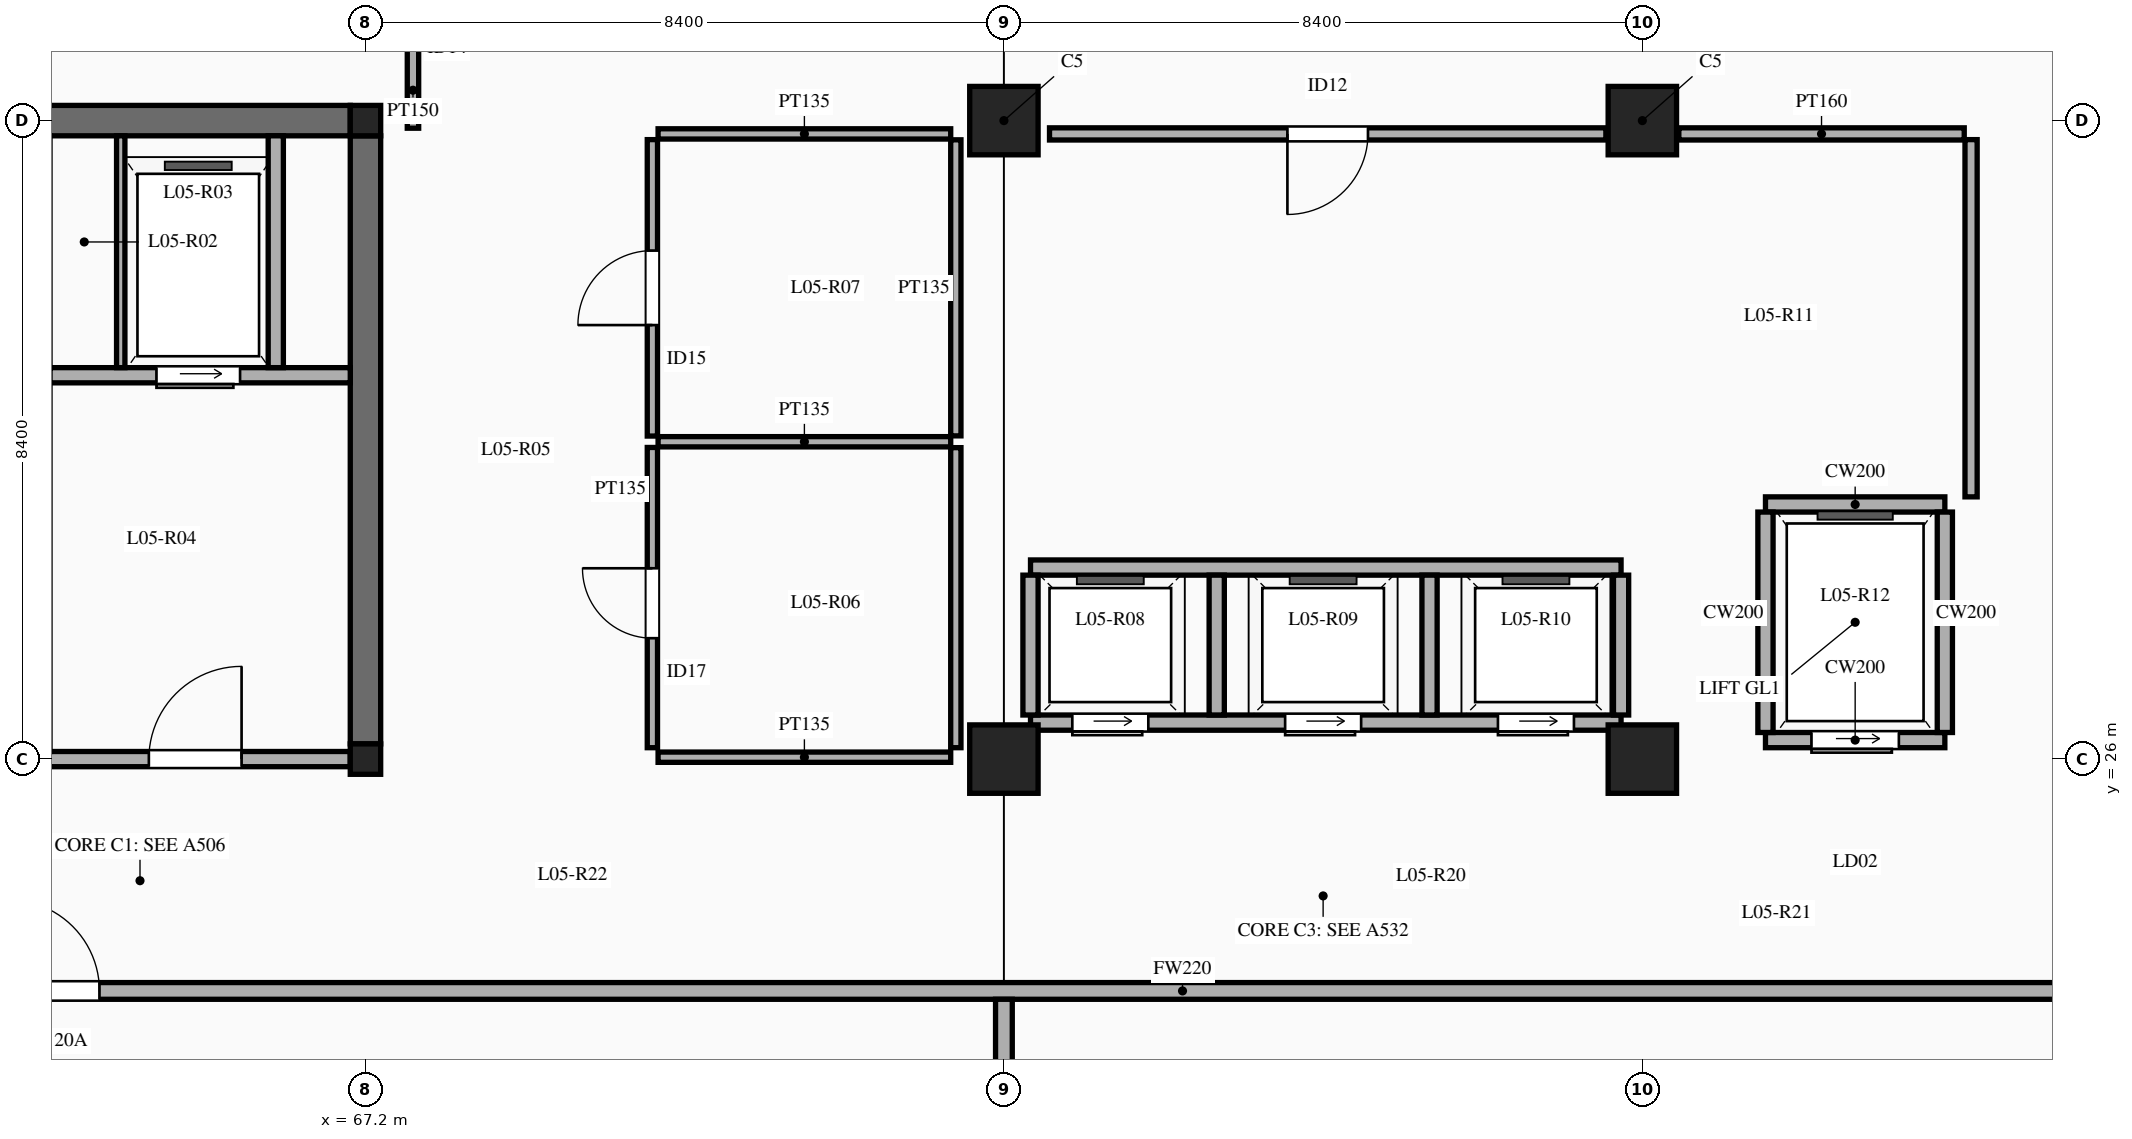
"""IFC4 building model, lengths in metres.
Left out: names, types, materials, properties, quantities, classifications, styles, units other than length and angle.
Written with IfcOpenShell. Run it as: python <this file> out.ifc"""

import sys

from ifc_helpers import new_model, si_unit, direction, frame, frame_2d, origin, origin_2d, place, context, subcontext, project, spatial, rectangle, extrude, element, fill, save


model = new_model("IFC4")
c1 = context("Model", 3, precision=1e-05, world=origin(), true_north=direction((0.0, 1.0)))
c2 = subcontext(c1, "Body", "Model", "MODEL_VIEW")
j1 = project(units=[si_unit("LENGTHUNIT", "METRE"), si_unit("PLANEANGLEUNIT", "RADIAN")], contexts=[c1])
p1 = place(None, origin())
s1 = spatial("IfcSite", under=j1, at=p1, CompositionType="ELEMENT")
p2 = place(p1, origin())
s2 = spatial("IfcBuilding", under=s1, at=p2, CompositionType="ELEMENT")
p3 = place(p2, frame((0.0, 0.0, 24.0)))
s3 = spatial("IfcBuildingStorey", under=s2, at=p3, CompositionType="ELEMENT", Elevation=24.0)
for number, where, z_axis, x_axis in (
    (1, (67.2, 26.0, 0.0), (0.0, 0.0, 1.0), (1.0, 0.0, 0.0)),
    (2, (67.2, 34.4, 0.0), (0.0, 0.0, 1.0), (1.0, 0.0, 0.0)),
):
    element("IfcColumn", number, at=place(p3, frame(where, z_axis=z_axis, x_axis=x_axis)), inside=s3, PredefinedType="COLUMN", context=c2, shape_type="SweptSolid", body=[
        extrude(rectangle(XDim=0.4, YDim=0.4, at=origin_2d()), origin(), (0.0, 0.0, 1.0), 4.5),
    ])
for number, where, z_axis, x_axis in (
    (3, (75.6, 26.0, 0.0), (0.0, 0.0, 1.0), (1.0, 0.0, 0.0)),
    (4, (75.6, 34.4, 0.0), (0.0, 0.0, 1.0), (1.0, 0.0, 0.0)),
    (5, (84.0, 26.0, 0.0), (0.0, 0.0, 1.0), (1.0, 0.0, 0.0)),
    (6, (84.0, 34.4, 0.0), (0.0, 0.0, 1.0), (1.0, 0.0, 0.0)),
):
    element("IfcColumn", number, at=place(p3, frame(where, z_axis=z_axis, x_axis=x_axis)), inside=s3, PredefinedType="COLUMN", context=c2, shape_type="SweptSolid", body=[
        extrude(rectangle(XDim=0.9, YDim=0.9, at=origin_2d()), origin(), (0.0, 0.0, 1.0), 4.5),
    ])
for number, where, z_axis, x_axis in (
    (7, (67.2, 26.2, 0.0), (0.0, 0.0, 1.0), (0.0, 1.0, 0.0)),
    (8, (59.0, 34.4, 0.0), (0.0, 0.0, 1.0), (1.0, 0.0, 0.0)),
):
    element("IfcWall", number, at=place(p3, frame(where, z_axis=z_axis, x_axis=x_axis)), inside=s3, PredefinedType="SHEAR", context=c2, shape_type="SweptSolid", body=[
        extrude(rectangle(XDim=8.0, YDim=0.4, at=frame_2d((4.0, 0.0))), origin(), (0.0, 0.0, 1.0), 4.5),
    ])
p4 = place(p3, frame((59.0, 26.0, 0.0), z_axis=(0.0, 0.0, 1.0), x_axis=(1.0, 0.0, 0.0)))
e9 = element("IfcWall", 9, at=p4, inside=s3, PredefinedType="SOLIDWALL", context=c2, shape_type="SweptSolid", body=[
    extrude(rectangle(XDim=8.0, YDim=0.2, at=frame_2d((4.0, 0.0))), origin(), (0.0, 0.0, 1.0), 3.58),
])
p5 = place(p4, frame((1.55, 0.0, 0.0)))
e10 = element("IfcOpeningElement", 10, at=p5, cuts=e9, PredefinedType="OPENING", context=c2, shape_type="SweptSolid", body=[
    extrude(rectangle(XDim=1.15, YDim=2.15, at=frame_2d((0.575, 1.075))), frame((0.0, 0.11, 0.0), z_axis=(0.0, -1.0, 0.0), x_axis=(1.0, 0.0, 0.0)), (0.0, 0.0, 1.0), 0.22),
])
p6 = place(p4, frame((5.35, 0.0, 0.0)))
e11 = element("IfcOpeningElement", 11, at=p6, cuts=e9, PredefinedType="OPENING", context=c2, shape_type="SweptSolid", body=[
    extrude(rectangle(XDim=1.22, YDim=2.15, at=frame_2d((0.61, 1.075))), frame((0.0, 0.11, 0.0), z_axis=(0.0, -1.0, 0.0), x_axis=(1.0, 0.0, 0.0)), (0.0, 0.0, 1.0), 0.22),
])
p7 = place(p3, frame((63.05, 31.05, 0.0), z_axis=(0.0, 0.0, 1.0), x_axis=(1.0, 0.0, 0.0)))
e12 = element("IfcWall", 12, at=p7, inside=s3, PredefinedType="SOLIDWALL", context=c2, shape_type="SweptSolid", body=[
    extrude(rectangle(XDim=3.95, YDim=0.2, at=frame_2d((1.975, 0.0))), origin(), (0.0, 0.0, 1.0), 4.25),
])
p8 = place(p7, frame((1.4, 0.0, 0.0)))
e13 = element("IfcOpeningElement", 13, at=p8, cuts=e12, PredefinedType="OPENING", context=c2, shape_type="SweptSolid", body=[
    extrude(rectangle(XDim=1.1, YDim=2.15, at=frame_2d((0.55, 1.075))), frame((0.0, 0.11, 0.0), z_axis=(0.0, -1.0, 0.0), x_axis=(1.0, 0.0, 0.0)), (0.0, 0.0, 1.0), 0.22),
])
p9 = place(p3, frame((63.98, 31.15, 0.0), z_axis=(0.0, 0.0, 1.0), x_axis=(0.0, 1.0, 0.0)))
e14 = element("IfcWall", 14, at=p9, inside=s3, PredefinedType="PARTITIONING", context=c2, shape_type="SweptSolid", body=[
    extrude(rectangle(XDim=3.05, YDim=0.11, at=frame_2d((1.525, 0.0))), origin(), (0.0, 0.0, 1.0), 4.25),
])
p10 = place(p3, frame((66.02, 31.15, 0.0), z_axis=(0.0, 0.0, 1.0), x_axis=(0.0, 1.0, 0.0)))
e15 = element("IfcWall", 15, at=p10, inside=s3, PredefinedType="SOLIDWALL", context=c2, shape_type="SweptSolid", body=[
    extrude(rectangle(XDim=3.05, YDim=0.2, at=frame_2d((1.525, 0.0))), origin(), (0.0, 0.0, 1.0), 4.25),
])
p11 = place(p3, frame((75.95, 26.48, 0.0), z_axis=(0.0, 0.0, 1.0), x_axis=(1.0, 0.0, 0.0)))
e16 = element("IfcWall", 16, at=p11, inside=s3, PredefinedType="SOLIDWALL", context=c2, shape_type="SweptSolid", body=[
    extrude(rectangle(XDim=7.77, YDim=0.2, at=frame_2d((3.885, 0.0))), origin(), (0.0, 0.0, 1.0), 4.25),
])
p12 = place(p11, frame((0.55, 0.0, 0.0)))
e17 = element("IfcOpeningElement", 17, at=p12, cuts=e16, PredefinedType="OPENING", context=c2, shape_type="SweptSolid", body=[
    extrude(rectangle(XDim=1.0, YDim=2.15, at=frame_2d((0.5, 1.075))), frame((0.0, 0.11, 0.0), z_axis=(0.0, -1.0, 0.0), x_axis=(1.0, 0.0, 0.0)), (0.0, 0.0, 1.0), 0.22),
])
p13 = place(p11, frame((3.35, 0.0, 0.0)))
e18 = element("IfcOpeningElement", 18, at=p13, cuts=e16, PredefinedType="OPENING", context=c2, shape_type="SweptSolid", body=[
    extrude(rectangle(XDim=1.0, YDim=2.15, at=frame_2d((0.5, 1.075))), frame((0.0, 0.11, 0.0), z_axis=(0.0, -1.0, 0.0), x_axis=(1.0, 0.0, 0.0)), (0.0, 0.0, 1.0), 0.22),
])
p14 = place(p11, frame((6.15, 0.0, 0.0)))
e19 = element("IfcOpeningElement", 19, at=p14, cuts=e16, PredefinedType="OPENING", context=c2, shape_type="SweptSolid", body=[
    extrude(rectangle(XDim=1.0, YDim=2.15, at=frame_2d((0.5, 1.075))), frame((0.0, 0.11, 0.0), z_axis=(0.0, -1.0, 0.0), x_axis=(1.0, 0.0, 0.0)), (0.0, 0.0, 1.0), 0.22),
])
p15 = place(p3, frame((75.95, 28.52, 0.0), z_axis=(0.0, 0.0, 1.0), x_axis=(1.0, 0.0, 0.0)))
e20 = element("IfcWall", 20, at=p15, inside=s3, PredefinedType="SOLIDWALL", context=c2, shape_type="SweptSolid", body=[
    extrude(rectangle(XDim=7.77, YDim=0.2, at=frame_2d((3.885, 0.0))), origin(), (0.0, 0.0, 1.0), 4.25),
])
p16 = place(p3, frame((75.95, 26.58, 0.0), z_axis=(0.0, 0.0, 1.0), x_axis=(0.0, 1.0, 0.0)))
e21 = element("IfcWall", 21, at=p16, inside=s3, PredefinedType="SOLIDWALL", context=c2, shape_type="SweptSolid", body=[
    extrude(rectangle(XDim=1.84, YDim=0.2, at=frame_2d((0.92, 0.0))), origin(), (0.0, 0.0, 1.0), 3.68),
])
for number, where, z_axis, x_axis in (
    (22, (78.4, 26.58, 0.0), (0.0, 0.0, 1.0), (0.0, 1.0, 0.0)),
    (23, (81.2, 26.58, 0.0), (0.0, 0.0, 1.0), (0.0, 1.0, 0.0)),
):
    element("IfcWall", number, at=place(p3, frame(where, z_axis=z_axis, x_axis=x_axis)), inside=s3, PredefinedType="SOLIDWALL", context=c2, shape_type="SweptSolid", body=[
        extrude(rectangle(XDim=1.84, YDim=0.2, at=frame_2d((0.92, 0.0))), origin(), (0.0, 0.0, 1.0), 4.25),
    ])
p17 = place(p3, frame((83.72, 26.58, 0.0), z_axis=(0.0, 0.0, 1.0), x_axis=(0.0, 1.0, 0.0)))
e24 = element("IfcWall", 24, at=p17, inside=s3, PredefinedType="SOLIDWALL", context=c2, shape_type="SweptSolid", body=[
    extrude(rectangle(XDim=1.84, YDim=0.2, at=frame_2d((0.92, 0.0))), origin(), (0.0, 0.0, 1.0), 3.68),
])
p18 = place(p3, frame((85.62, 26.25, 0.0), z_axis=(0.0, 0.0, 1.0), x_axis=(1.0, 0.0, 0.0)))
e25 = element("IfcWall", 25, at=p18, inside=s3, PredefinedType="SOLIDWALL", context=c2, shape_type="SweptSolid", body=[
    extrude(rectangle(XDim=2.36, YDim=0.2, at=frame_2d((1.18, 0.0))), origin(), (0.0, 0.0, 1.0), 3.58),
])
p19 = place(p18, frame((0.605, 0.0, 0.0)))
e26 = element("IfcOpeningElement", 26, at=p19, cuts=e25, PredefinedType="OPENING", context=c2, shape_type="SweptSolid", body=[
    extrude(rectangle(XDim=1.15, YDim=2.2, at=frame_2d((0.575, 1.1))), frame((0.0, 0.11, 0.0), z_axis=(0.0, -1.0, 0.0), x_axis=(1.0, 0.0, 0.0)), (0.0, 0.0, 1.0), 0.22),
])
p20 = place(p3, frame((85.62, 29.35, 0.0), z_axis=(0.0, 0.0, 1.0), x_axis=(1.0, 0.0, 0.0)))
e27 = element("IfcWall", 27, at=p20, inside=s3, PredefinedType="SOLIDWALL", context=c2, shape_type="SweptSolid", body=[
    extrude(rectangle(XDim=2.36, YDim=0.2, at=frame_2d((1.18, 0.0))), origin(), (0.0, 0.0, 1.0), 4.25),
])
p21 = place(p3, frame((85.62, 26.35, 0.0), z_axis=(0.0, 0.0, 1.0), x_axis=(0.0, 1.0, 0.0)))
e28 = element("IfcWall", 28, at=p21, inside=s3, PredefinedType="SOLIDWALL", context=c2, shape_type="SweptSolid", body=[
    extrude(rectangle(XDim=2.9, YDim=0.2, at=frame_2d((1.45, 0.0))), origin(), (0.0, 0.0, 1.0), 4.25),
])
p22 = place(p3, frame((87.98, 26.35, 0.0), z_axis=(0.0, 0.0, 1.0), x_axis=(0.0, 1.0, 0.0)))
e29 = element("IfcWall", 29, at=p22, inside=s3, PredefinedType="SOLIDWALL", context=c2, shape_type="SweptSolid", body=[
    extrude(rectangle(XDim=2.9, YDim=0.2, at=frame_2d((1.45, 0.0))), origin(), (0.0, 0.0, 1.0), 3.88),
])
p23 = place(p3, frame((59.5, 22.95, 0.0), z_axis=(0.0, 0.0, 1.0), x_axis=(1.0, 0.0, 0.0)))
e30 = element("IfcWall", 30, at=p23, inside=s3, PredefinedType="SOLIDWALL", context=c2, shape_type="SweptSolid", body=[
    extrude(rectangle(XDim=32.2, YDim=0.22, at=frame_2d((16.1, 0.0))), origin(), (0.0, 0.0, 1.0), 3.45),
])
p24 = place(p23, frame((3.0, 0.0, 0.0)))
e31 = element("IfcOpeningElement", 31, at=p24, cuts=e30, PredefinedType="OPENING", context=c2, shape_type="SweptSolid", body=[
    extrude(rectangle(XDim=1.2, YDim=2.2, at=frame_2d((0.6, 1.1))), frame((0.0, 0.12, 0.0), z_axis=(0.0, -1.0, 0.0), x_axis=(1.0, 0.0, 0.0)), (0.0, 0.0, 1.0), 0.24),
])
p25 = place(p3, frame((75.6, 17.01, 0.0), z_axis=(0.0, 0.0, 1.0), x_axis=(0.0, 1.0, 0.0)))
e32 = element("IfcWall", 32, at=p25, inside=s3, PredefinedType="SOLIDWALL", context=c2, shape_type="SweptSolid", body=[
    extrude(rectangle(XDim=5.83, YDim=0.22, at=frame_2d((2.915, 0.0))), origin(), (0.0, 0.0, 1.0), 3.45),
])
p26 = place(p3, frame((70.975, 26.15, 0.0), z_axis=(0.0, 0.0, 1.0), x_axis=(0.0, 1.0, 0.0)))
e33 = element("IfcWall", 33, at=p26, inside=s3, PredefinedType="PARTITIONING", context=c2, shape_type="SweptSolid", body=[
    extrude(rectangle(XDim=3.95, YDim=0.135, at=frame_2d((1.975, 0.0))), origin(), (0.0, 0.0, 1.0), 3.45),
])
p27 = place(p26, frame((1.441, 0.0, 0.0)))
e34 = element("IfcOpeningElement", 34, at=p27, cuts=e33, PredefinedType="OPENING", context=c2, shape_type="SweptSolid", body=[
    extrude(rectangle(XDim=0.92, YDim=2.12, at=frame_2d((0.46, 1.06))), frame((0.0, 0.077, 0.0), z_axis=(0.0, -1.0, 0.0), x_axis=(1.0, 0.0, 0.0)), (0.0, 0.0, 1.0), 0.155),
])
p28 = place(p3, frame((70.975, 30.25, 0.0), z_axis=(0.0, 0.0, 1.0), x_axis=(0.0, 1.0, 0.0)))
e35 = element("IfcWall", 35, at=p28, inside=s3, PredefinedType="PARTITIONING", context=c2, shape_type="SweptSolid", body=[
    extrude(rectangle(XDim=3.9, YDim=0.135, at=frame_2d((1.95, 0.0))), origin(), (0.0, 0.0, 1.0), 3.45),
])
p29 = place(p28, frame((1.46, 0.0, 0.0)))
e36 = element("IfcOpeningElement", 36, at=p29, cuts=e35, PredefinedType="OPENING", context=c2, shape_type="SweptSolid", body=[
    extrude(rectangle(XDim=0.98, YDim=2.15, at=frame_2d((0.49, 1.075))), frame((0.0, 0.077, 0.0), z_axis=(0.0, -1.0, 0.0), x_axis=(1.0, 0.0, 0.0)), (0.0, 0.0, 1.0), 0.155),
])
for number, where, z_axis, x_axis in (
    (37, (71.05, 30.175, 0.0), (0.0, 0.0, 1.0), (1.0, 0.0, 0.0)),
    (38, (71.05, 26.025, 0.0), (0.0, 0.0, 1.0), (1.0, 0.0, 0.0)),
    (39, (71.05, 34.225, 0.0), (0.0, 0.0, 1.0), (1.0, 0.0, 0.0)),
):
    element("IfcWall", number, at=place(p3, frame(where, z_axis=z_axis, x_axis=x_axis)), inside=s3, PredefinedType="PARTITIONING", context=c2, shape_type="SweptSolid", body=[
        extrude(rectangle(XDim=3.85, YDim=0.135, at=frame_2d((1.925, 0.0))), origin(), (0.0, 0.0, 1.0), 3.45),
    ])
p30 = place(p3, frame((88.325, 29.45, 0.0), z_axis=(0.0, 0.0, 1.0), x_axis=(0.0, 1.0, 0.0)))
e40 = element("IfcWall", 40, at=p30, inside=s3, PredefinedType="PARTITIONING", context=c2, shape_type="SweptSolid", body=[
    extrude(rectangle(XDim=4.7, YDim=0.16, at=frame_2d((2.35, 0.0))), origin(), (0.0, 0.0, 1.0), 3.45),
])
p31 = place(p3, frame((76.2, 34.225, 0.0), z_axis=(0.0, 0.0, 1.0), x_axis=(1.0, 0.0, 0.0)))
e41 = element("IfcWall", 41, at=p31, inside=s3, PredefinedType="PARTITIONING", context=c2, shape_type="SweptSolid", body=[
    extrude(rectangle(XDim=7.32, YDim=0.16, at=frame_2d((3.66, 0.0))), origin(), (0.0, 0.0, 1.0), 3.45),
])
p32 = place(p31, frame((3.13, 0.0, 0.0)))
e42 = element("IfcOpeningElement", 42, at=p32, cuts=e41, PredefinedType="OPENING", context=c2, shape_type="SweptSolid", body=[
    extrude(rectangle(XDim=1.06, YDim=2.18, at=frame_2d((0.53, 1.09))), frame((0.0, 0.09, 0.0), z_axis=(0.0, -1.0, 0.0), x_axis=(1.0, 0.0, 0.0)), (0.0, 0.0, 1.0), 0.18),
])
p33 = place(p3, frame((84.48, 34.225, 0.0), z_axis=(0.0, 0.0, 1.0), x_axis=(1.0, 0.0, 0.0)))
e43 = element("IfcWall", 43, at=p33, inside=s3, PredefinedType="PARTITIONING", context=c2, shape_type="SweptSolid", body=[
    extrude(rectangle(XDim=3.755, YDim=0.16, at=frame_2d((1.877, 0.0))), origin(), (0.0, 0.0, 1.0), 3.45),
])
p34 = place(p3, frame((67.825, 34.3, 0.0), z_axis=(0.0, 0.0, 1.0), x_axis=(0.0, 1.0, 0.0)))
e44 = element("IfcWall", 44, at=p34, inside=s3, PredefinedType="PARTITIONING", context=c2, shape_type="SweptSolid", body=[
    extrude(rectangle(XDim=2.75, YDim=0.15, at=frame_2d((1.375, 0.0))), origin(), (0.0, 0.0, 1.0), 3.45),
])
p35 = place(p34, frame((1.5, 0.0, 0.0)))
e45 = element("IfcOpeningElement", 45, at=p35, cuts=e44, PredefinedType="OPENING", context=c2, shape_type="SweptSolid", body=[
    extrude(rectangle(XDim=1.0, YDim=2.15, at=frame_2d((0.5, 1.075))), frame((0.0, 0.085, 0.0), z_axis=(0.0, -1.0, 0.0), x_axis=(1.0, 0.0, 0.0)), (0.0, 0.0, 1.0), 0.17),
])
p36 = place(p3, frame((74.968, 26.15, 0.0), z_axis=(0.0, 0.0, 1.0), x_axis=(0.0, 1.0, 0.0)))
e46 = element("IfcWall", 46, at=p36, inside=s3, PredefinedType="PARTITIONING", context=c2, shape_type="SweptSolid", body=[
    extrude(rectangle(XDim=3.948, YDim=0.135, at=frame_2d((1.974, 0.0))), origin(), (0.0, 0.0, 1.0), 3.45),
])
p37 = place(p3, frame((74.968, 30.252, 0.0), z_axis=(0.0, 0.0, 1.0), x_axis=(0.0, 1.0, 0.0)))
e47 = element("IfcWall", 47, at=p37, inside=s3, PredefinedType="PARTITIONING", context=c2, shape_type="SweptSolid", body=[
    extrude(rectangle(XDim=3.895, YDim=0.135, at=frame_2d((1.948, 0.0))), origin(), (0.0, 0.0, 1.0), 3.45),
])
p38 = place(p6, origin())
e48 = element("IfcDoor", 48, at=p38, inside=s3, OperationType="SINGLE_SWING_RIGHT", PredefinedType="DOOR", context=c2, shape_type="SweptSolid", body=[
    extrude(rectangle(XDim=1.22, YDim=2.15, at=frame_2d((0.61, 1.075))), frame((0.0, 0.025, 0.0), z_axis=(0.0, -1.0, 0.0), x_axis=(1.0, 0.0, 0.0)), (0.0, 0.0, 1.0), 0.05),
])
fill(e11, e48)
p39 = place(p8, frame((1.1, 0.0, 0.0), z_axis=(0.0, 0.0, 1.0), x_axis=(-1.0, 0.0, 0.0)))
e49 = element("IfcDoor", 49, at=p39, inside=s3, OperationType="SLIDING_TO_LEFT", PredefinedType="DOOR", context=c2, shape_type="SweptSolid", body=[
    extrude(rectangle(XDim=1.1, YDim=2.15, at=frame_2d((0.55, 1.075))), frame((0.0, 0.025, 0.0), z_axis=(0.0, -1.0, 0.0), x_axis=(1.0, 0.0, 0.0)), (0.0, 0.0, 1.0), 0.05),
])
fill(e13, e49)
p40 = place(p12, frame((1.0, 0.0, 0.0), z_axis=(0.0, 0.0, 1.0), x_axis=(-1.0, 0.0, 0.0)))
e50 = element("IfcDoor", 50, at=p40, inside=s3, OperationType="SLIDING_TO_LEFT", PredefinedType="DOOR", context=c2, shape_type="SweptSolid", body=[
    extrude(rectangle(XDim=1.0, YDim=2.15, at=frame_2d((0.5, 1.075))), frame((0.0, 0.025, 0.0), z_axis=(0.0, -1.0, 0.0), x_axis=(1.0, 0.0, 0.0)), (0.0, 0.0, 1.0), 0.05),
])
fill(e17, e50)
p41 = place(p13, frame((1.0, 0.0, 0.0), z_axis=(0.0, 0.0, 1.0), x_axis=(-1.0, 0.0, 0.0)))
e51 = element("IfcDoor", 51, at=p41, inside=s3, OperationType="SLIDING_TO_LEFT", PredefinedType="DOOR", context=c2, shape_type="SweptSolid", body=[
    extrude(rectangle(XDim=1.0, YDim=2.15, at=frame_2d((0.5, 1.075))), frame((0.0, 0.025, 0.0), z_axis=(0.0, -1.0, 0.0), x_axis=(1.0, 0.0, 0.0)), (0.0, 0.0, 1.0), 0.05),
])
fill(e18, e51)
p42 = place(p14, frame((1.0, 0.0, 0.0), z_axis=(0.0, 0.0, 1.0), x_axis=(-1.0, 0.0, 0.0)))
e52 = element("IfcDoor", 52, at=p42, inside=s3, OperationType="SLIDING_TO_LEFT", PredefinedType="DOOR", context=c2, shape_type="SweptSolid", body=[
    extrude(rectangle(XDim=1.0, YDim=2.15, at=frame_2d((0.5, 1.075))), frame((0.0, 0.025, 0.0), z_axis=(0.0, -1.0, 0.0), x_axis=(1.0, 0.0, 0.0)), (0.0, 0.0, 1.0), 0.05),
])
fill(e19, e52)
p43 = place(p19, frame((1.15, 0.0, 0.0), z_axis=(0.0, 0.0, 1.0), x_axis=(-1.0, 0.0, 0.0)))
e53 = element("IfcDoor", 53, at=p43, inside=s3, OperationType="SLIDING_TO_LEFT", PredefinedType="DOOR", context=c2, shape_type="SweptSolid", body=[
    extrude(rectangle(XDim=1.15, YDim=2.2, at=frame_2d((0.575, 1.1))), frame((0.0, 0.025, 0.0), z_axis=(0.0, -1.0, 0.0), x_axis=(1.0, 0.0, 0.0)), (0.0, 0.0, 1.0), 0.05),
])
fill(e26, e53)
p44 = place(p24, origin())
e54 = element("IfcDoor", 54, at=p44, inside=s3, OperationType="SINGLE_SWING_LEFT", PredefinedType="DOOR", context=c2, shape_type="SweptSolid", body=[
    extrude(rectangle(XDim=1.2, YDim=2.2, at=frame_2d((0.6, 1.1))), frame((0.0, 0.025, 0.0), z_axis=(0.0, -1.0, 0.0), x_axis=(1.0, 0.0, 0.0)), (0.0, 0.0, 1.0), 0.05),
])
fill(e31, e54)
p45 = place(p27, origin())
e55 = element("IfcDoor", 55, at=p45, inside=s3, OperationType="SINGLE_SWING_RIGHT", PredefinedType="DOOR", context=c2, shape_type="SweptSolid", body=[
    extrude(rectangle(XDim=0.92, YDim=2.12, at=frame_2d((0.46, 1.06))), frame((0.0, 0.025, 0.0), z_axis=(0.0, -1.0, 0.0), x_axis=(1.0, 0.0, 0.0)), (0.0, 0.0, 1.0), 0.05),
])
fill(e34, e55)
p46 = place(p29, origin())
e56 = element("IfcDoor", 56, at=p46, inside=s3, OperationType="SINGLE_SWING_LEFT", PredefinedType="DOOR", context=c2, shape_type="SweptSolid", body=[
    extrude(rectangle(XDim=0.98, YDim=2.15, at=frame_2d((0.49, 1.075))), frame((0.0, 0.025, 0.0), z_axis=(0.0, -1.0, 0.0), x_axis=(1.0, 0.0, 0.0)), (0.0, 0.0, 1.0), 0.05),
])
fill(e36, e56)
p47 = place(p32, frame((1.06, 0.0, 0.0), z_axis=(0.0, 0.0, 1.0), x_axis=(-1.0, 0.0, 0.0)))
e57 = element("IfcDoor", 57, at=p47, inside=s3, OperationType="SINGLE_SWING_RIGHT", PredefinedType="DOOR", context=c2, shape_type="SweptSolid", body=[
    extrude(rectangle(XDim=1.06, YDim=2.18, at=frame_2d((0.53, 1.09))), frame((0.0, 0.025, 0.0), z_axis=(0.0, -1.0, 0.0), x_axis=(1.0, 0.0, 0.0)), (0.0, 0.0, 1.0), 0.05),
])
fill(e42, e57)
save(model, sys.argv[1])
